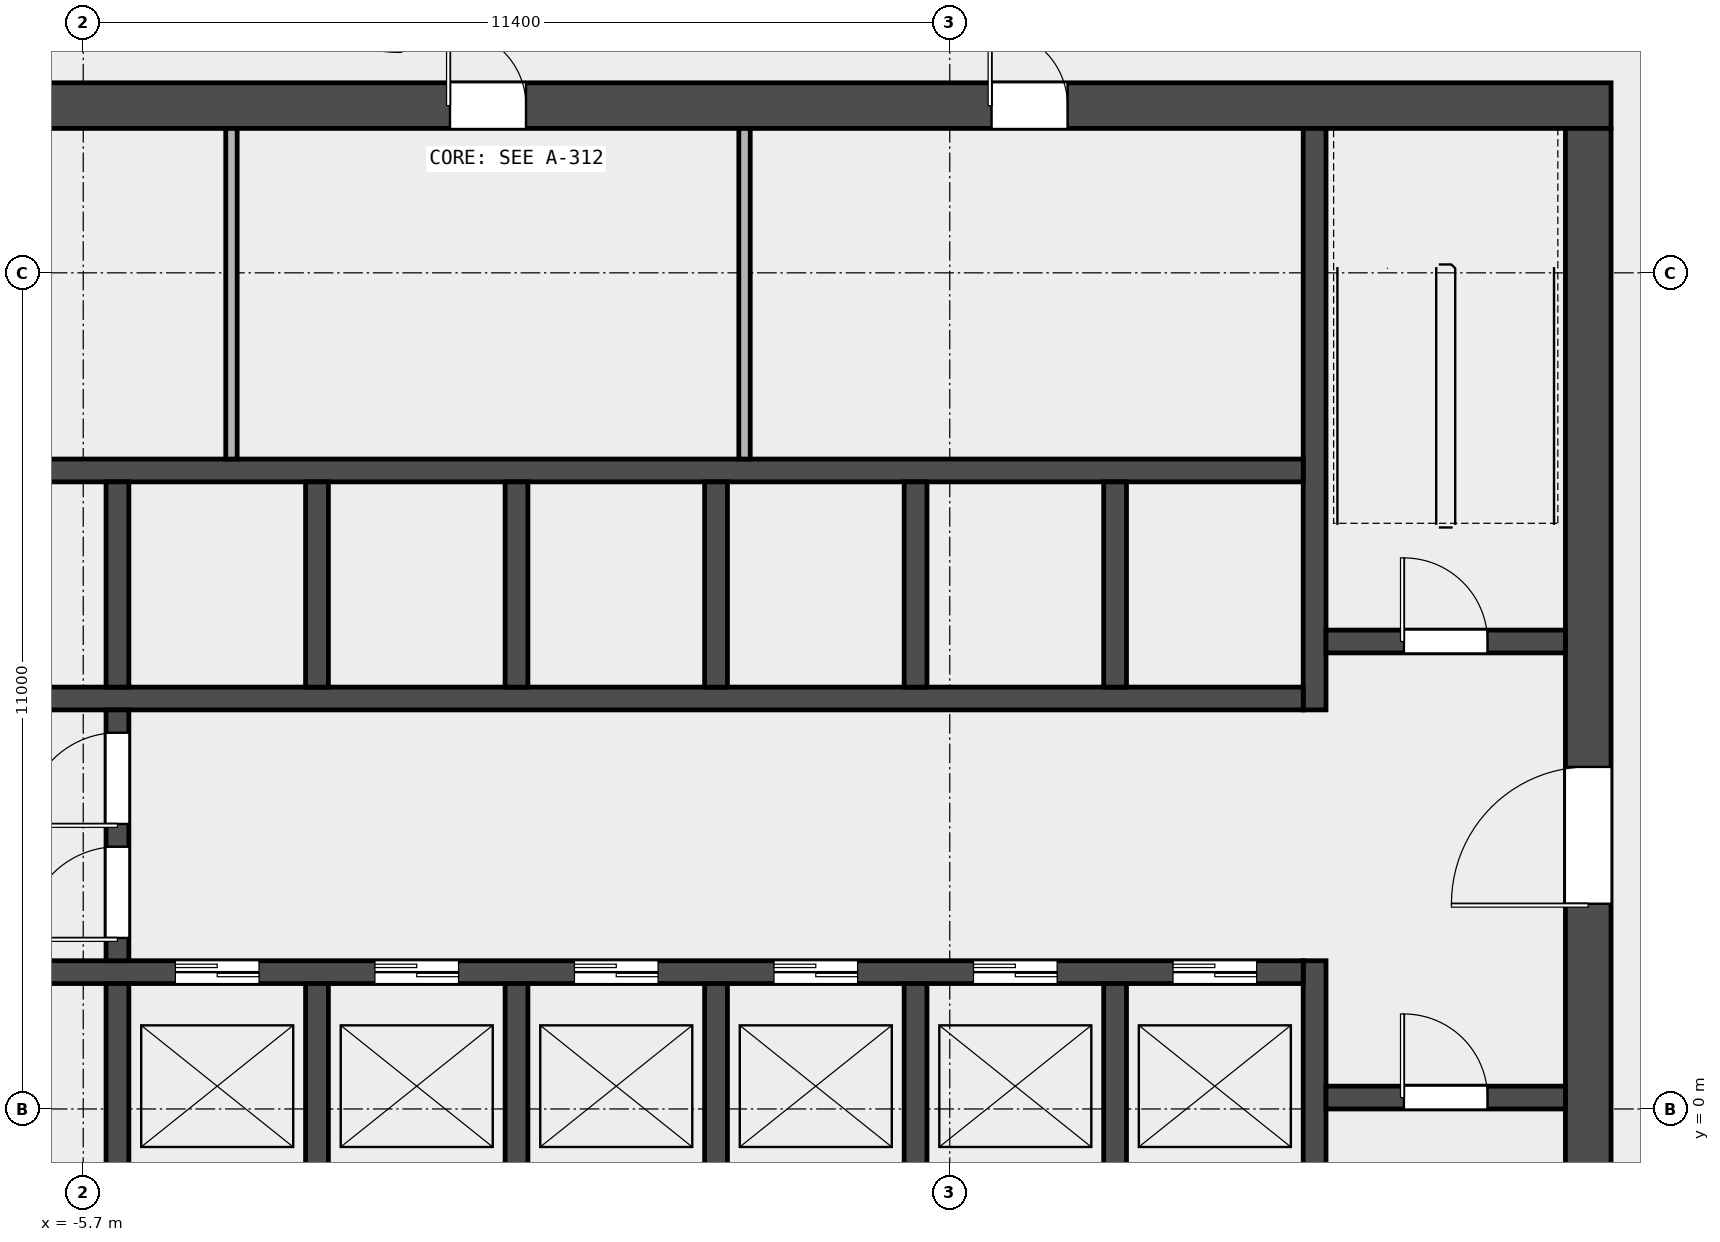
"""IFC4 building model, lengths in metres.
Left out: names, types, materials, properties, quantities, classifications, styles, units other than length and angle.
Written with IfcOpenShell. Run it as: python <this file> out.ifc"""

import sys

from ifc_helpers import new_model, si_unit, direction, frame, frame_2d, origin, place, context, subcontext, project, spatial, rectangle, extrude, element, fill, save


model = new_model("IFC4")
c1 = context("Model", 3, precision=1e-05, world=origin(), true_north=direction((0.0, 1.0)))
c2 = subcontext(c1, "Body", "Model", "MODEL_VIEW")
j1 = project(units=[si_unit("LENGTHUNIT", "METRE"), si_unit("PLANEANGLEUNIT", "RADIAN")], contexts=[c1])
p1 = place(None, origin())
s1 = spatial("IfcSite", under=j1, at=p1, CompositionType="ELEMENT")
p2 = place(p1, origin())
s2 = spatial("IfcBuilding", under=s1, at=p2, CompositionType="ELEMENT")
p3 = place(p2, frame((0.0, 0.0, 135.1)))
s3 = spatial("IfcBuildingStorey", under=s2, at=p3, CompositionType="ELEMENT", Elevation=135.1)
p4 = place(p3, frame((-14.4, 13.2, 0.0), z_axis=(0.0, 0.0, 1.0), x_axis=(1.0, 0.0, 0.0)))
e1 = element("IfcWall", 1, at=p4, inside=s3, PredefinedType="SHEAR", context=c2, shape_type="SweptSolid", body=[
    extrude(rectangle(XDim=28.8, YDim=0.6, at=frame_2d((14.4, 0.0))), origin(), (0.0, 0.0, 1.0), 4.2),
])
p5 = place(p4, frame((6.775, 0.0, 0.0)))
e2 = element("IfcOpeningElement", 2, at=p5, cuts=e1, PredefinedType="OPENING", context=c2, shape_type="SweptSolid", body=[
    extrude(rectangle(XDim=1.0, YDim=2.1, at=frame_2d((0.5, 1.05))), frame((0.0, 0.312, 0.0), z_axis=(0.0, -1.0, 0.0), x_axis=(1.0, 0.0, 0.0)), (0.0, 0.0, 1.0), 0.624),
])
p6 = place(p4, frame((13.525, 0.0, 0.0)))
e3 = element("IfcOpeningElement", 3, at=p6, cuts=e1, PredefinedType="OPENING", context=c2, shape_type="SweptSolid", body=[
    extrude(rectangle(XDim=1.0, YDim=2.1, at=frame_2d((0.5, 1.05))), frame((0.0, 0.312, 0.0), z_axis=(0.0, -1.0, 0.0), x_axis=(1.0, 0.0, 0.0)), (0.0, 0.0, 1.0), 0.624),
])
p7 = place(p4, frame((20.65, 0.0, 0.0)))
e4 = element("IfcOpeningElement", 4, at=p7, cuts=e1, PredefinedType="OPENING", context=c2, shape_type="SweptSolid", body=[
    extrude(rectangle(XDim=1.0, YDim=2.1, at=frame_2d((0.5, 1.05))), frame((0.0, 0.312, 0.0), z_axis=(0.0, -1.0, 0.0), x_axis=(1.0, 0.0, 0.0)), (0.0, 0.0, 1.0), 0.624),
])
p8 = place(p3, frame((14.1, -6.6, 0.0), z_axis=(0.0, 0.0, 1.0), x_axis=(0.0, 1.0, 0.0)))
e5 = element("IfcWall", 5, at=p8, inside=s3, PredefinedType="SHEAR", context=c2, shape_type="SweptSolid", body=[
    extrude(rectangle(XDim=19.5, YDim=0.6, at=frame_2d((9.75, 0.0))), origin(), (0.0, 0.0, 1.0), 4.2),
])
p9 = place(p8, frame((9.3, 0.0, 0.0)))
e6 = element("IfcOpeningElement", 6, at=p9, cuts=e5, PredefinedType="OPENING", context=c2, shape_type="SweptSolid", body=[
    extrude(rectangle(XDim=1.8, YDim=2.1, at=frame_2d((0.9, 1.05))), frame((0.0, 0.312, 0.0), z_axis=(0.0, -1.0, 0.0), x_axis=(1.0, 0.0, 0.0)), (0.0, 0.0, 1.0), 0.624),
])
p10 = place(p3, frame((10.5, -6.6, 0.0), z_axis=(0.0, 0.0, 1.0), x_axis=(0.0, 1.0, 0.0)))
e7 = element("IfcWall", 7, at=p10, inside=s3, PredefinedType="SHEAR", context=c2, shape_type="SweptSolid", body=[
    extrude(rectangle(XDim=8.55, YDim=0.3, at=frame_2d((4.275, 0.0))), origin(), (0.0, 0.0, 1.0), 4.2),
])
p11 = place(p3, frame((10.5, 5.25, 0.0), z_axis=(0.0, 0.0, 1.0), x_axis=(0.0, 1.0, 0.0)))
e8 = element("IfcWall", 8, at=p11, inside=s3, PredefinedType="SHEAR", context=c2, shape_type="SweptSolid", body=[
    extrude(rectangle(XDim=7.65, YDim=0.3, at=frame_2d((3.825, 0.0))), origin(), (0.0, 0.0, 1.0), 4.2),
])
p12 = place(p3, frame((10.65, 0.15, 0.0), z_axis=(0.0, 0.0, 1.0), x_axis=(1.0, 0.0, 0.0)))
e9 = element("IfcWall", 9, at=p12, inside=s3, PredefinedType="SOLIDWALL", context=c2, shape_type="SweptSolid", body=[
    extrude(rectangle(XDim=3.15, YDim=0.3, at=frame_2d((1.575, 0.0))), origin(), (0.0, 0.0, 1.0), 4.2),
])
p13 = place(p12, frame((1.025, 0.0, 0.0)))
e10 = element("IfcOpeningElement", 10, at=p13, cuts=e9, PredefinedType="OPENING", context=c2, shape_type="SweptSolid", body=[
    extrude(rectangle(XDim=1.1, YDim=2.1, at=frame_2d((0.55, 1.05))), frame((0.0, 0.162, 0.0), z_axis=(0.0, -1.0, 0.0), x_axis=(1.0, 0.0, 0.0)), (0.0, 0.0, 1.0), 0.324),
])
p14 = place(p3, frame((10.65, 6.15, 0.0), z_axis=(0.0, 0.0, 1.0), x_axis=(1.0, 0.0, 0.0)))
e11 = element("IfcWall", 11, at=p14, inside=s3, PredefinedType="SOLIDWALL", context=c2, shape_type="SweptSolid", body=[
    extrude(rectangle(XDim=3.15, YDim=0.3, at=frame_2d((1.575, 0.0))), origin(), (0.0, 0.0, 1.0), 4.2),
])
p15 = place(p14, frame((1.025, 0.0, 0.0)))
e12 = element("IfcOpeningElement", 12, at=p15, cuts=e11, PredefinedType="OPENING", context=c2, shape_type="SweptSolid", body=[
    extrude(rectangle(XDim=1.1, YDim=2.1, at=frame_2d((0.55, 1.05))), frame((0.0, 0.162, 0.0), z_axis=(0.0, -1.0, 0.0), x_axis=(1.0, 0.0, 0.0)), (0.0, 0.0, 1.0), 0.324),
])
p16 = place(p3, frame((-10.35, 1.8, 0.0), z_axis=(0.0, 0.0, 1.0), x_axis=(1.0, 0.0, 0.0)))
e13 = element("IfcWall", 13, at=p16, inside=s3, PredefinedType="SOLIDWALL", context=c2, shape_type="SweptSolid", body=[
    extrude(rectangle(XDim=20.7, YDim=0.3, at=frame_2d((10.35, 0.0))), origin(), (0.0, 0.0, 1.0), 4.2),
])
p17 = place(p16, frame((0.512, 0.0, 0.0)))
e14 = element("IfcOpeningElement", 14, at=p17, cuts=e13, PredefinedType="OPENING", context=c2, shape_type="SweptSolid", body=[
    extrude(rectangle(XDim=1.3, YDim=2.1, at=frame_2d((0.65, 1.05))), frame((0.0, 0.162, 0.0), z_axis=(0.0, -1.0, 0.0), x_axis=(1.0, 0.0, 0.0)), (0.0, 0.0, 1.0), 0.324),
])
p18 = place(p16, frame((5.863, 0.0, 0.0)))
e15 = element("IfcOpeningElement", 15, at=p18, cuts=e13, PredefinedType="OPENING", context=c2, shape_type="SweptSolid", body=[
    extrude(rectangle(XDim=1.1, YDim=2.1, at=frame_2d((0.55, 1.05))), frame((0.0, 0.162, 0.0), z_axis=(0.0, -1.0, 0.0), x_axis=(1.0, 0.0, 0.0)), (0.0, 0.0, 1.0), 0.324),
])
p19 = place(p16, frame((8.488, 0.0, 0.0)))
e16 = element("IfcOpeningElement", 16, at=p19, cuts=e13, PredefinedType="OPENING", context=c2, shape_type="SweptSolid", body=[
    extrude(rectangle(XDim=1.1, YDim=2.1, at=frame_2d((0.55, 1.05))), frame((0.0, 0.162, 0.0), z_axis=(0.0, -1.0, 0.0), x_axis=(1.0, 0.0, 0.0)), (0.0, 0.0, 1.0), 0.324),
])
p20 = place(p16, frame((11.113, 0.0, 0.0)))
e17 = element("IfcOpeningElement", 17, at=p20, cuts=e13, PredefinedType="OPENING", context=c2, shape_type="SweptSolid", body=[
    extrude(rectangle(XDim=1.1, YDim=2.1, at=frame_2d((0.55, 1.05))), frame((0.0, 0.162, 0.0), z_axis=(0.0, -1.0, 0.0), x_axis=(1.0, 0.0, 0.0)), (0.0, 0.0, 1.0), 0.324),
])
p21 = place(p16, frame((13.738, 0.0, 0.0)))
e18 = element("IfcOpeningElement", 18, at=p21, cuts=e13, PredefinedType="OPENING", context=c2, shape_type="SweptSolid", body=[
    extrude(rectangle(XDim=1.1, YDim=2.1, at=frame_2d((0.55, 1.05))), frame((0.0, 0.162, 0.0), z_axis=(0.0, -1.0, 0.0), x_axis=(1.0, 0.0, 0.0)), (0.0, 0.0, 1.0), 0.324),
])
p22 = place(p16, frame((16.363, 0.0, 0.0)))
e19 = element("IfcOpeningElement", 19, at=p22, cuts=e13, PredefinedType="OPENING", context=c2, shape_type="SweptSolid", body=[
    extrude(rectangle(XDim=1.1, YDim=2.1, at=frame_2d((0.55, 1.05))), frame((0.0, 0.162, 0.0), z_axis=(0.0, -1.0, 0.0), x_axis=(1.0, 0.0, 0.0)), (0.0, 0.0, 1.0), 0.324),
])
p23 = place(p16, frame((18.988, 0.0, 0.0)))
e20 = element("IfcOpeningElement", 20, at=p23, cuts=e13, PredefinedType="OPENING", context=c2, shape_type="SweptSolid", body=[
    extrude(rectangle(XDim=1.1, YDim=2.1, at=frame_2d((0.55, 1.05))), frame((0.0, 0.162, 0.0), z_axis=(0.0, -1.0, 0.0), x_axis=(1.0, 0.0, 0.0)), (0.0, 0.0, 1.0), 0.324),
])
p24 = place(p3, frame((-10.35, 5.4, 0.0), z_axis=(0.0, 0.0, 1.0), x_axis=(1.0, 0.0, 0.0)))
e21 = element("IfcWall", 21, at=p24, inside=s3, PredefinedType="SOLIDWALL", context=c2, shape_type="SweptSolid", body=[
    extrude(rectangle(XDim=20.7, YDim=0.3, at=frame_2d((10.35, 0.0))), origin(), (0.0, 0.0, 1.0), 4.2),
])
p25 = place(p24, frame((0.512, 0.0, 0.0)))
e22 = element("IfcOpeningElement", 22, at=p25, cuts=e21, PredefinedType="OPENING", context=c2, shape_type="SweptSolid", body=[
    extrude(rectangle(XDim=1.3, YDim=2.1, at=frame_2d((0.65, 1.05))), frame((0.0, 0.162, 0.0), z_axis=(0.0, -1.0, 0.0), x_axis=(1.0, 0.0, 0.0)), (0.0, 0.0, 1.0), 0.324),
])
p26 = place(p3, frame((-10.35, 8.4, 0.0), z_axis=(0.0, 0.0, 1.0), x_axis=(1.0, 0.0, 0.0)))
e23 = element("IfcWall", 23, at=p26, inside=s3, PredefinedType="SOLIDWALL", context=c2, shape_type="SweptSolid", body=[
    extrude(rectangle(XDim=20.7, YDim=0.3, at=frame_2d((10.35, 0.0))), origin(), (0.0, 0.0, 1.0), 4.2),
])
for number, where, z_axis, x_axis in (
    (24, (-5.25, -1.05, 0.0), (0.0, 0.0, 1.0), (0.0, 1.0, 0.0)),
    (25, (-2.625, -1.05, 0.0), (0.0, 0.0, 1.0), (0.0, 1.0, 0.0)),
    (26, (0.0, -1.05, 0.0), (0.0, 0.0, 1.0), (0.0, 1.0, 0.0)),
    (27, (2.625, -1.05, 0.0), (0.0, 0.0, 1.0), (0.0, 1.0, 0.0)),
    (28, (5.25, -1.05, 0.0), (0.0, 0.0, 1.0), (0.0, 1.0, 0.0)),
    (29, (7.875, -1.05, 0.0), (0.0, 0.0, 1.0), (0.0, 1.0, 0.0)),
    (30, (-5.25, 5.55, 0.0), (0.0, 0.0, 1.0), (0.0, 1.0, 0.0)),
    (31, (-2.625, 5.55, 0.0), (0.0, 0.0, 1.0), (0.0, 1.0, 0.0)),
    (32, (0.0, 5.55, 0.0), (0.0, 0.0, 1.0), (0.0, 1.0, 0.0)),
    (33, (2.625, 5.55, 0.0), (0.0, 0.0, 1.0), (0.0, 1.0, 0.0)),
    (34, (5.25, 5.55, 0.0), (0.0, 0.0, 1.0), (0.0, 1.0, 0.0)),
    (35, (7.875, 5.55, 0.0), (0.0, 0.0, 1.0), (0.0, 1.0, 0.0)),
):
    element("IfcWall", number, at=place(p3, frame(where, z_axis=z_axis, x_axis=x_axis)), inside=s3, PredefinedType="SOLIDWALL", context=c2, shape_type="SweptSolid", body=[
        extrude(rectangle(XDim=2.7, YDim=0.3, at=frame_2d((1.35, 0.0))), origin(), (0.0, 0.0, 1.0), 4.2),
    ])
p27 = place(p3, frame((-5.25, 1.95, 0.0), z_axis=(0.0, 0.0, 1.0), x_axis=(0.0, 1.0, 0.0)))
e36 = element("IfcWall", 36, at=p27, inside=s3, PredefinedType="SOLIDWALL", context=c2, shape_type="SweptSolid", body=[
    extrude(rectangle(XDim=3.3, YDim=0.3, at=frame_2d((1.65, 0.0))), origin(), (0.0, 0.0, 1.0), 4.2),
])
p28 = place(p27, frame((0.3, 0.0, 0.0)))
e37 = element("IfcOpeningElement", 37, at=p28, cuts=e36, PredefinedType="OPENING", context=c2, shape_type="SweptSolid", body=[
    extrude(rectangle(XDim=1.2, YDim=2.1, at=frame_2d((0.6, 1.05))), frame((0.0, 0.162, 0.0), z_axis=(0.0, -1.0, 0.0), x_axis=(1.0, 0.0, 0.0)), (0.0, 0.0, 1.0), 0.324),
])
p29 = place(p27, frame((1.8, 0.0, 0.0)))
e38 = element("IfcOpeningElement", 38, at=p29, cuts=e36, PredefinedType="OPENING", context=c2, shape_type="SweptSolid", body=[
    extrude(rectangle(XDim=1.2, YDim=2.1, at=frame_2d((0.6, 1.05))), frame((0.0, 0.162, 0.0), z_axis=(0.0, -1.0, 0.0), x_axis=(1.0, 0.0, 0.0)), (0.0, 0.0, 1.0), 0.324),
])
for number, where, z_axis, x_axis in (
    (39, (-3.75, 8.55, 0.0), (0.0, 0.0, 1.0), (0.0, 1.0, 0.0)),
    (40, (3.0, 8.55, 0.0), (0.0, 0.0, 1.0), (0.0, 1.0, 0.0)),
):
    element("IfcWall", number, at=place(p3, frame(where, z_axis=z_axis, x_axis=x_axis)), inside=s3, PredefinedType="PARTITIONING", context=c2, shape_type="SweptSolid", body=[
        extrude(rectangle(XDim=4.35, YDim=0.15, at=frame_2d((2.175, 0.0))), origin(), (0.0, 0.0, 1.0), 4.2),
    ])
p30 = place(p13, origin())
e41 = element("IfcDoor", 41, at=p30, inside=s3, OperationType="SINGLE_SWING_RIGHT", PredefinedType="DOOR", context=c2, shape_type="SweptSolid", body=[
    extrude(rectangle(XDim=1.1, YDim=2.1, at=frame_2d((0.55, 1.05))), frame((0.0, 0.025, 0.0), z_axis=(0.0, -1.0, 0.0), x_axis=(1.0, 0.0, 0.0)), (0.0, 0.0, 1.0), 0.05),
])
fill(e10, e41)
p31 = place(p15, origin())
e42 = element("IfcDoor", 42, at=p31, inside=s3, OperationType="SINGLE_SWING_RIGHT", PredefinedType="DOOR", context=c2, shape_type="SweptSolid", body=[
    extrude(rectangle(XDim=1.1, YDim=2.1, at=frame_2d((0.55, 1.05))), frame((0.0, 0.025, 0.0), z_axis=(0.0, -1.0, 0.0), x_axis=(1.0, 0.0, 0.0)), (0.0, 0.0, 1.0), 0.05),
])
fill(e12, e42)
p32 = place(p9, origin())
e43 = element("IfcDoor", 43, at=p32, inside=s3, OperationType="DOUBLE_DOOR_SINGLE_SWING", PredefinedType="DOOR", context=c2, shape_type="SweptSolid", body=[
    extrude(rectangle(XDim=1.8, YDim=2.1, at=frame_2d((0.9, 1.05))), frame((0.0, 0.025, 0.0), z_axis=(0.0, -1.0, 0.0), x_axis=(1.0, 0.0, 0.0)), (0.0, 0.0, 1.0), 0.05),
])
fill(e6, e43)
p33 = place(p28, origin())
e44 = element("IfcDoor", 44, at=p33, inside=s3, OperationType="SINGLE_SWING_LEFT", PredefinedType="DOOR", context=c2, shape_type="SweptSolid", body=[
    extrude(rectangle(XDim=1.2, YDim=2.1, at=frame_2d((0.6, 1.05))), frame((0.0, 0.025, 0.0), z_axis=(0.0, -1.0, 0.0), x_axis=(1.0, 0.0, 0.0)), (0.0, 0.0, 1.0), 0.05),
])
fill(e37, e44)
p34 = place(p29, origin())
e45 = element("IfcDoor", 45, at=p34, inside=s3, OperationType="SINGLE_SWING_RIGHT", PredefinedType="DOOR", context=c2, shape_type="SweptSolid", body=[
    extrude(rectangle(XDim=1.2, YDim=2.1, at=frame_2d((0.6, 1.05))), frame((0.0, 0.025, 0.0), z_axis=(0.0, -1.0, 0.0), x_axis=(1.0, 0.0, 0.0)), (0.0, 0.0, 1.0), 0.05),
])
fill(e38, e45)
p35 = place(p18, origin())
e46 = element("IfcDoor", 46, at=p35, inside=s3, OperationType="DOUBLE_DOOR_SLIDING", PredefinedType="DOOR", context=c2, shape_type="SweptSolid", body=[
    extrude(rectangle(XDim=1.1, YDim=2.1, at=frame_2d((0.55, 1.05))), frame((0.0, 0.025, 0.0), z_axis=(0.0, -1.0, 0.0), x_axis=(1.0, 0.0, 0.0)), (0.0, 0.0, 1.0), 0.05),
])
fill(e15, e46)
p36 = place(p19, origin())
e47 = element("IfcDoor", 47, at=p36, inside=s3, OperationType="DOUBLE_DOOR_SLIDING", PredefinedType="DOOR", context=c2, shape_type="SweptSolid", body=[
    extrude(rectangle(XDim=1.1, YDim=2.1, at=frame_2d((0.55, 1.05))), frame((0.0, 0.025, 0.0), z_axis=(0.0, -1.0, 0.0), x_axis=(1.0, 0.0, 0.0)), (0.0, 0.0, 1.0), 0.05),
])
fill(e16, e47)
p37 = place(p20, origin())
e48 = element("IfcDoor", 48, at=p37, inside=s3, OperationType="DOUBLE_DOOR_SLIDING", PredefinedType="DOOR", context=c2, shape_type="SweptSolid", body=[
    extrude(rectangle(XDim=1.1, YDim=2.1, at=frame_2d((0.55, 1.05))), frame((0.0, 0.025, 0.0), z_axis=(0.0, -1.0, 0.0), x_axis=(1.0, 0.0, 0.0)), (0.0, 0.0, 1.0), 0.05),
])
fill(e17, e48)
p38 = place(p21, origin())
e49 = element("IfcDoor", 49, at=p38, inside=s3, OperationType="DOUBLE_DOOR_SLIDING", PredefinedType="DOOR", context=c2, shape_type="SweptSolid", body=[
    extrude(rectangle(XDim=1.1, YDim=2.1, at=frame_2d((0.55, 1.05))), frame((0.0, 0.025, 0.0), z_axis=(0.0, -1.0, 0.0), x_axis=(1.0, 0.0, 0.0)), (0.0, 0.0, 1.0), 0.05),
])
fill(e18, e49)
p39 = place(p22, origin())
e50 = element("IfcDoor", 50, at=p39, inside=s3, OperationType="DOUBLE_DOOR_SLIDING", PredefinedType="DOOR", context=c2, shape_type="SweptSolid", body=[
    extrude(rectangle(XDim=1.1, YDim=2.1, at=frame_2d((0.55, 1.05))), frame((0.0, 0.025, 0.0), z_axis=(0.0, -1.0, 0.0), x_axis=(1.0, 0.0, 0.0)), (0.0, 0.0, 1.0), 0.05),
])
fill(e19, e50)
p40 = place(p23, origin())
e51 = element("IfcDoor", 51, at=p40, inside=s3, OperationType="DOUBLE_DOOR_SLIDING", PredefinedType="DOOR", context=c2, shape_type="SweptSolid", body=[
    extrude(rectangle(XDim=1.1, YDim=2.1, at=frame_2d((0.55, 1.05))), frame((0.0, 0.025, 0.0), z_axis=(0.0, -1.0, 0.0), x_axis=(1.0, 0.0, 0.0)), (0.0, 0.0, 1.0), 0.05),
])
fill(e20, e51)
p41 = place(p6, origin())
e52 = element("IfcDoor", 52, at=p41, inside=s3, OperationType="SINGLE_SWING_LEFT", PredefinedType="DOOR", context=c2, shape_type="SweptSolid", body=[
    extrude(rectangle(XDim=1.0, YDim=2.1, at=frame_2d((0.5, 1.05))), frame((0.0, 0.025, 0.0), z_axis=(0.0, -1.0, 0.0), x_axis=(1.0, 0.0, 0.0)), (0.0, 0.0, 1.0), 0.05),
])
fill(e3, e52)
p42 = place(p7, origin())
e53 = element("IfcDoor", 53, at=p42, inside=s3, OperationType="SINGLE_SWING_LEFT", PredefinedType="DOOR", context=c2, shape_type="SweptSolid", body=[
    extrude(rectangle(XDim=1.0, YDim=2.1, at=frame_2d((0.5, 1.05))), frame((0.0, 0.025, 0.0), z_axis=(0.0, -1.0, 0.0), x_axis=(1.0, 0.0, 0.0)), (0.0, 0.0, 1.0), 0.05),
])
fill(e4, e53)
save(model, sys.argv[1])
